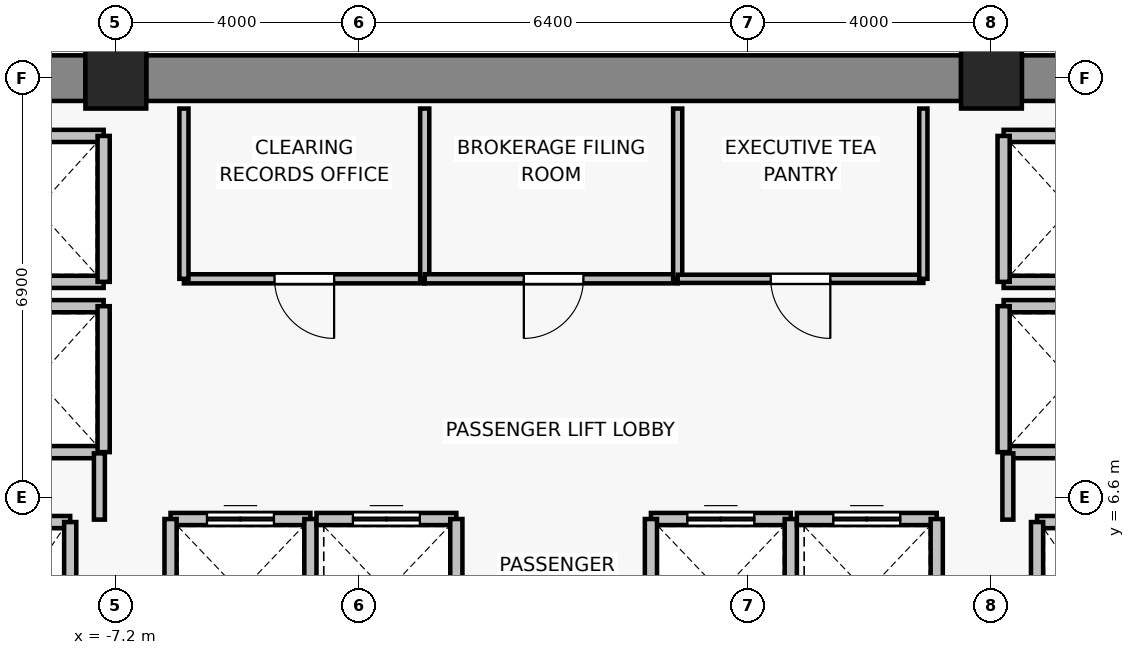
"""IFC4 building model, lengths in metres.
Left out: names, types, materials, properties, quantities, classifications, styles, units other than length and angle.
Written with IfcOpenShell. Run it as: python <this file> out.ifc"""

import sys

from ifc_helpers import new_model, si_unit, direction, frame, frame_2d, origin, origin_2d, place, context, subcontext, project, spatial, rectangle, extrude, source, transform, mapped, element, fill, save


model = new_model("IFC4")
c1 = context("Model", 3, precision=1e-05, world=origin(), true_north=direction((0.0, 1.0)))
c2 = subcontext(c1, "Body", "Model", "MODEL_VIEW")
j1 = project(units=[si_unit("LENGTHUNIT", "METRE"), si_unit("PLANEANGLEUNIT", "RADIAN")], contexts=[c1])
p1 = place(None, origin())
s1 = spatial("IfcSite", under=j1, at=p1, CompositionType="ELEMENT")
p2 = place(p1, origin())
s2 = spatial("IfcBuilding", under=s1, at=p2, CompositionType="ELEMENT")
p3 = place(p2, frame((0.0, 0.0, 113.2)))
s3 = spatial("IfcBuildingStorey", under=s2, at=p3, CompositionType="ELEMENT", Elevation=113.2)
for number, where, z_axis, x_axis in (
    (1, (-7.2, 13.5, 0.0), (0.0, 0.0, 1.0), (1.0, 0.0, 0.0)),
    (2, (7.2, 13.5, 0.0), (0.0, 0.0, 1.0), (1.0, 0.0, 0.0)),
):
    element("IfcColumn", number, at=place(p3, frame(where, z_axis=z_axis, x_axis=x_axis)), inside=s3, PredefinedType="COLUMN", context=c2, shape_type="SweptSolid", body=[
        extrude(rectangle(XDim=1.0, YDim=1.0, at=origin_2d()), origin(), (0.0, 0.0, 1.0), 3.3),
    ])
p4 = place(p3, frame((-13.9, 13.5, 0.0), z_axis=(0.0, 0.0, 1.0), x_axis=(1.0, 0.0, 0.0)))
e3 = element("IfcWall", 3, at=p4, inside=s3, PredefinedType="SHEAR", context=c2, shape_type="SweptSolid", body=[
    extrude(rectangle(XDim=6.2, YDim=0.75, at=frame_2d((3.1, 0.0))), origin(), (0.0, 0.0, 1.0), 3.075),
])
p5 = place(p3, frame((-6.7, 13.5, 0.0), z_axis=(0.0, 0.0, 1.0), x_axis=(1.0, 0.0, 0.0)))
e4 = element("IfcWall", 4, at=p5, inside=s3, PredefinedType="SHEAR", context=c2, shape_type="SweptSolid", body=[
    extrude(rectangle(XDim=13.4, YDim=0.75, at=frame_2d((6.7, 0.0))), origin(), (0.0, 0.0, 1.0), 3.075),
])
p6 = place(p3, frame((7.7, 13.5, 0.0), z_axis=(0.0, 0.0, 1.0), x_axis=(1.0, 0.0, 0.0)))
e5 = element("IfcWall", 5, at=p6, inside=s3, PredefinedType="SHEAR", context=c2, shape_type="SweptSolid", body=[
    extrude(rectangle(XDim=6.2, YDim=0.75, at=frame_2d((3.1, 0.0))), origin(), (0.0, 0.0, 1.0), 3.075),
])
p7 = place(p3, frame((-9.95, 6.2, 0.0), z_axis=(0.0, 0.0, 1.0), x_axis=(1.0, 0.0, 0.0)))
e6 = element("IfcWall", 6, at=p7, inside=s3, PredefinedType="SOLIDWALL", context=c2, shape_type="SweptSolid", body=[
    extrude(rectangle(XDim=2.0, YDim=0.2, at=frame_2d((1.0, 0.0))), origin(), (0.0, 0.0, 1.0), 3.075),
])
p8 = place(p3, frame((-7.95, 6.2, 0.0), z_axis=(0.0, 0.0, 1.0), x_axis=(0.0, -1.0, 0.0)))
e7 = element("IfcWall", 7, at=p8, inside=s3, PredefinedType="SOLIDWALL", context=c2, shape_type="SweptSolid", body=[
    extrude(rectangle(XDim=2.8, YDim=0.2, at=frame_2d((1.4, 0.0))), origin(), (0.0, 0.0, 1.0), 3.075),
])
p9 = place(p3, frame((7.95, 6.2, 0.0), z_axis=(0.0, 0.0, 1.0), x_axis=(1.0, 0.0, 0.0)))
e8 = element("IfcWall", 8, at=p9, inside=s3, PredefinedType="SOLIDWALL", context=c2, shape_type="SweptSolid", body=[
    extrude(rectangle(XDim=2.0, YDim=0.2, at=frame_2d((1.0, 0.0))), origin(), (0.0, 0.0, 1.0), 3.075),
])
p10 = place(p3, frame((7.95, 3.4, 0.0), z_axis=(0.0, 0.0, 1.0), x_axis=(0.0, 1.0, 0.0)))
e9 = element("IfcWall", 9, at=p10, inside=s3, PredefinedType="SOLIDWALL", context=c2, shape_type="SweptSolid", body=[
    extrude(rectangle(XDim=2.8, YDim=0.2, at=frame_2d((1.4, 0.0))), origin(), (0.0, 0.0, 1.0), 3.075),
])
p11 = place(p3, frame((-6.3, 6.25, 0.0), z_axis=(0.0, 0.0, 1.0), x_axis=(1.0, 0.0, 0.0)))
e10 = element("IfcWall", 10, at=p11, inside=s3, PredefinedType="SOLIDWALL", context=c2, shape_type="SweptSolid", body=[
    extrude(rectangle(XDim=2.3, YDim=0.2, at=frame_2d((1.15, 0.0))), origin(), (0.0, 0.0, 1.0), 3.075),
])
p12 = place(p11, frame((0.6, 0.0, 0.0)))
e11 = element("IfcOpeningElement", 11, at=p12, cuts=e10, PredefinedType="OPENING", context=c2, shape_type="SweptSolid", body=[
    extrude(rectangle(XDim=1.1, YDim=2.2, at=frame_2d((0.55, 1.1))), frame((0.0, 0.11, 0.0), z_axis=(0.0, -1.0, 0.0), x_axis=(1.0, 0.0, 0.0)), (0.0, 0.0, 1.0), 0.22),
])
for number, where, z_axis, x_axis in (
    (12, (-6.3, 3.85, 0.0), (0.0, 0.0, 1.0), (0.0, 1.0, 0.0)),
    (13, (-4.0, 6.25, 0.0), (0.0, 0.0, 1.0), (0.0, -1.0, 0.0)),
):
    element("IfcWall", number, at=place(p3, frame(where, z_axis=z_axis, x_axis=x_axis)), inside=s3, PredefinedType="SOLIDWALL", context=c2, shape_type="SweptSolid", body=[
        extrude(rectangle(XDim=2.4, YDim=0.2, at=frame_2d((1.2, 0.0))), origin(), (0.0, 0.0, 1.0), 3.075),
    ])
p13 = place(p3, frame((-3.9, 6.25, 0.0), z_axis=(0.0, 0.0, 1.0), x_axis=(1.0, 0.0, 0.0)))
e14 = element("IfcWall", 14, at=p13, inside=s3, PredefinedType="SOLIDWALL", context=c2, shape_type="SweptSolid", body=[
    extrude(rectangle(XDim=2.3, YDim=0.2, at=frame_2d((1.15, 0.0))), origin(), (0.0, 0.0, 1.0), 3.075),
])
p14 = place(p13, frame((0.6, 0.0, 0.0)))
e15 = element("IfcOpeningElement", 15, at=p14, cuts=e14, PredefinedType="OPENING", context=c2, shape_type="SweptSolid", body=[
    extrude(rectangle(XDim=1.1, YDim=2.2, at=frame_2d((0.55, 1.1))), frame((0.0, 0.11, 0.0), z_axis=(0.0, -1.0, 0.0), x_axis=(1.0, 0.0, 0.0)), (0.0, 0.0, 1.0), 0.22),
])
p15 = place(p3, frame((-1.6, 6.25, 0.0), z_axis=(0.0, 0.0, 1.0), x_axis=(0.0, -1.0, 0.0)))
e16 = element("IfcWall", 16, at=p15, inside=s3, PredefinedType="SOLIDWALL", context=c2, shape_type="SweptSolid", body=[
    extrude(rectangle(XDim=2.4, YDim=0.2, at=frame_2d((1.2, 0.0))), origin(), (0.0, 0.0, 1.0), 3.075),
])
p16 = place(p3, frame((1.6, 6.25, 0.0), z_axis=(0.0, 0.0, 1.0), x_axis=(1.0, 0.0, 0.0)))
e17 = element("IfcWall", 17, at=p16, inside=s3, PredefinedType="SOLIDWALL", context=c2, shape_type="SweptSolid", body=[
    extrude(rectangle(XDim=2.3, YDim=0.2, at=frame_2d((1.15, 0.0))), origin(), (0.0, 0.0, 1.0), 3.075),
])
p17 = place(p16, frame((0.6, 0.0, 0.0)))
e18 = element("IfcOpeningElement", 18, at=p17, cuts=e17, PredefinedType="OPENING", context=c2, shape_type="SweptSolid", body=[
    extrude(rectangle(XDim=1.1, YDim=2.2, at=frame_2d((0.55, 1.1))), frame((0.0, 0.11, 0.0), z_axis=(0.0, -1.0, 0.0), x_axis=(1.0, 0.0, 0.0)), (0.0, 0.0, 1.0), 0.22),
])
for number, where, z_axis, x_axis in (
    (19, (1.6, 3.85, 0.0), (0.0, 0.0, 1.0), (0.0, 1.0, 0.0)),
    (20, (3.9, 6.25, 0.0), (0.0, 0.0, 1.0), (0.0, -1.0, 0.0)),
):
    element("IfcWall", number, at=place(p3, frame(where, z_axis=z_axis, x_axis=x_axis)), inside=s3, PredefinedType="SOLIDWALL", context=c2, shape_type="SweptSolid", body=[
        extrude(rectangle(XDim=2.4, YDim=0.2, at=frame_2d((1.2, 0.0))), origin(), (0.0, 0.0, 1.0), 3.075),
    ])
p18 = place(p3, frame((4.0, 6.25, 0.0), z_axis=(0.0, 0.0, 1.0), x_axis=(1.0, 0.0, 0.0)))
e21 = element("IfcWall", 21, at=p18, inside=s3, PredefinedType="SOLIDWALL", context=c2, shape_type="SweptSolid", body=[
    extrude(rectangle(XDim=2.3, YDim=0.2, at=frame_2d((1.15, 0.0))), origin(), (0.0, 0.0, 1.0), 3.075),
])
p19 = place(p18, frame((0.6, 0.0, 0.0)))
e22 = element("IfcOpeningElement", 22, at=p19, cuts=e21, PredefinedType="OPENING", context=c2, shape_type="SweptSolid", body=[
    extrude(rectangle(XDim=1.1, YDim=2.2, at=frame_2d((0.55, 1.1))), frame((0.0, 0.11, 0.0), z_axis=(0.0, -1.0, 0.0), x_axis=(1.0, 0.0, 0.0)), (0.0, 0.0, 1.0), 0.22),
])
p20 = place(p3, frame((6.3, 6.25, 0.0), z_axis=(0.0, 0.0, 1.0), x_axis=(0.0, -1.0, 0.0)))
e23 = element("IfcWall", 23, at=p20, inside=s3, PredefinedType="SOLIDWALL", context=c2, shape_type="SweptSolid", body=[
    extrude(rectangle(XDim=2.4, YDim=0.2, at=frame_2d((1.2, 0.0))), origin(), (0.0, 0.0, 1.0), 3.075),
])
for number, where, z_axis, x_axis in (
    (24, (-7.4, 7.35, 0.0), (0.0, 0.0, 1.0), (-1.0, 0.0, 0.0)),
    (25, (-9.6, 9.75, 0.0), (0.0, 0.0, 1.0), (1.0, 0.0, 0.0)),
):
    element("IfcWall", number, at=place(p3, frame(where, z_axis=z_axis, x_axis=x_axis)), inside=s3, PredefinedType="SOLIDWALL", context=c2, shape_type="SweptSolid", body=[
        extrude(rectangle(XDim=2.2, YDim=0.2, at=frame_2d((1.1, 0.0))), origin(), (0.0, 0.0, 1.0), 2.515),
    ])
p21 = place(p3, frame((-7.4, 9.75, 0.0), z_axis=(0.0, 0.0, 1.0), x_axis=(0.0, -1.0, 0.0)))
e26 = element("IfcWall", 26, at=p21, inside=s3, PredefinedType="SOLIDWALL", context=c2, shape_type="SweptSolid", body=[
    extrude(rectangle(XDim=2.4, YDim=0.2, at=frame_2d((1.2, 0.0))), origin(), (0.0, 0.0, 1.0), 2.515),
])
for number, where, z_axis, x_axis in (
    (27, (-7.4, 10.15, 0.0), (0.0, 0.0, 1.0), (-1.0, 0.0, 0.0)),
    (28, (-9.6, 12.55, 0.0), (0.0, 0.0, 1.0), (1.0, 0.0, 0.0)),
):
    element("IfcWall", number, at=place(p3, frame(where, z_axis=z_axis, x_axis=x_axis)), inside=s3, PredefinedType="SOLIDWALL", context=c2, shape_type="SweptSolid", body=[
        extrude(rectangle(XDim=2.2, YDim=0.2, at=frame_2d((1.1, 0.0))), origin(), (0.0, 0.0, 1.0), 2.515),
    ])
p22 = place(p3, frame((-7.4, 12.55, 0.0), z_axis=(0.0, 0.0, 1.0), x_axis=(0.0, -1.0, 0.0)))
e29 = element("IfcWall", 29, at=p22, inside=s3, PredefinedType="SOLIDWALL", context=c2, shape_type="SweptSolid", body=[
    extrude(rectangle(XDim=2.4, YDim=0.2, at=frame_2d((1.2, 0.0))), origin(), (0.0, 0.0, 1.0), 2.515),
])
for number, where, z_axis, x_axis in (
    (30, (9.6, 7.35, 0.0), (0.0, 0.0, 1.0), (-1.0, 0.0, 0.0)),
    (31, (7.4, 9.75, 0.0), (0.0, 0.0, 1.0), (1.0, 0.0, 0.0)),
):
    element("IfcWall", number, at=place(p3, frame(where, z_axis=z_axis, x_axis=x_axis)), inside=s3, PredefinedType="SOLIDWALL", context=c2, shape_type="SweptSolid", body=[
        extrude(rectangle(XDim=2.2, YDim=0.2, at=frame_2d((1.1, 0.0))), origin(), (0.0, 0.0, 1.0), 2.515),
    ])
p23 = place(p3, frame((7.4, 7.35, 0.0), z_axis=(0.0, 0.0, 1.0), x_axis=(0.0, 1.0, 0.0)))
e32 = element("IfcWall", 32, at=p23, inside=s3, PredefinedType="SOLIDWALL", context=c2, shape_type="SweptSolid", body=[
    extrude(rectangle(XDim=2.4, YDim=0.2, at=frame_2d((1.2, 0.0))), origin(), (0.0, 0.0, 1.0), 2.515),
])
for number, where, z_axis, x_axis in (
    (33, (9.6, 10.15, 0.0), (0.0, 0.0, 1.0), (-1.0, 0.0, 0.0)),
    (34, (7.4, 12.55, 0.0), (0.0, 0.0, 1.0), (1.0, 0.0, 0.0)),
):
    element("IfcWall", number, at=place(p3, frame(where, z_axis=z_axis, x_axis=x_axis)), inside=s3, PredefinedType="SOLIDWALL", context=c2, shape_type="SweptSolid", body=[
        extrude(rectangle(XDim=2.2, YDim=0.2, at=frame_2d((1.1, 0.0))), origin(), (0.0, 0.0, 1.0), 2.515),
    ])
p24 = place(p3, frame((7.4, 10.15, 0.0), z_axis=(0.0, 0.0, 1.0), x_axis=(0.0, 1.0, 0.0)))
e35 = element("IfcWall", 35, at=p24, inside=s3, PredefinedType="SOLIDWALL", context=c2, shape_type="SweptSolid", body=[
    extrude(rectangle(XDim=2.4, YDim=0.2, at=frame_2d((1.2, 0.0))), origin(), (0.0, 0.0, 1.0), 2.515),
])
for number, where, z_axis, x_axis in (
    (36, (-7.47, 7.33, 0.0), (0.0, 0.0, 1.0), (0.0, -1.0, 0.0)),
    (37, (7.47, 6.24, 0.0), (0.0, 0.0, 1.0), (0.0, 1.0, 0.0)),
):
    element("IfcWall", number, at=place(p3, frame(where, z_axis=z_axis, x_axis=x_axis)), inside=s3, PredefinedType="PARTITIONING", context=c2, shape_type="SweptSolid", body=[
        extrude(rectangle(XDim=1.09, YDim=0.18, at=frame_2d((0.545, 0.0))), origin(), (0.0, 0.0, 1.0), 2.515),
    ])
p25 = place(p3, frame((-2.12, 10.2, 0.0), z_axis=(0.0, 0.0, 1.0), x_axis=(-1.0, 0.0, 0.0)))
e38 = element("IfcWall", 38, at=p25, inside=s3, PredefinedType="PARTITIONING", context=c2, shape_type="SweptSolid", body=[
    extrude(rectangle(XDim=3.96, YDim=0.15, at=frame_2d((1.98, 0.0))), origin(), (0.0, 0.0, 1.0), 3.075),
])
p26 = place(p25, frame((1.49, 0.0, 0.0)))
e39 = element("IfcOpeningElement", 39, at=p26, cuts=e38, PredefinedType="OPENING", context=c2, shape_type="SweptSolid", body=[
    extrude(rectangle(XDim=0.98, YDim=2.15, at=frame_2d((0.49, 1.075))), frame((0.0, 0.085, 0.0), z_axis=(0.0, -1.0, 0.0), x_axis=(1.0, 0.0, 0.0)), (0.0, 0.0, 1.0), 0.17),
])
for number, where, z_axis, x_axis in (
    (40, (-6.08, 10.2, 0.0), (0.0, 0.0, 1.0), (0.0, 1.0, 0.0)),
    (41, (-2.12, 13.0, 0.0), (0.0, 0.0, 1.0), (0.0, -1.0, 0.0)),
):
    element("IfcWall", number, at=place(p3, frame(where, z_axis=z_axis, x_axis=x_axis)), inside=s3, PredefinedType="PARTITIONING", context=c2, shape_type="SweptSolid", body=[
        extrude(rectangle(XDim=2.8, YDim=0.15, at=frame_2d((1.4, 0.0))), origin(), (0.0, 0.0, 1.0), 3.075),
    ])
p27 = place(p3, frame((2.04, 10.2, 0.0), z_axis=(0.0, 0.0, 1.0), x_axis=(-1.0, 0.0, 0.0)))
e42 = element("IfcWall", 42, at=p27, inside=s3, PredefinedType="PARTITIONING", context=c2, shape_type="SweptSolid", body=[
    extrude(rectangle(XDim=4.16, YDim=0.15, at=frame_2d((2.08, 0.0))), origin(), (0.0, 0.0, 1.0), 3.075),
])
p28 = place(p27, frame((1.55, 0.0, 0.0)))
e43 = element("IfcOpeningElement", 43, at=p28, cuts=e42, PredefinedType="OPENING", context=c2, shape_type="SweptSolid", body=[
    extrude(rectangle(XDim=0.98, YDim=2.15, at=frame_2d((0.49, 1.075))), frame((0.0, 0.085, 0.0), z_axis=(0.0, -1.0, 0.0), x_axis=(1.0, 0.0, 0.0)), (0.0, 0.0, 1.0), 0.17),
])
p29 = place(p3, frame((2.04, 13.0, 0.0), z_axis=(0.0, 0.0, 1.0), x_axis=(0.0, -1.0, 0.0)))
e44 = element("IfcWall", 44, at=p29, inside=s3, PredefinedType="PARTITIONING", context=c2, shape_type="SweptSolid", body=[
    extrude(rectangle(XDim=2.8, YDim=0.15, at=frame_2d((1.4, 0.0))), origin(), (0.0, 0.0, 1.0), 3.075),
])
p30 = place(p3, frame((6.08, 10.2, 0.0), z_axis=(0.0, 0.0, 1.0), x_axis=(-1.0, 0.0, 0.0)))
e45 = element("IfcWall", 45, at=p30, inside=s3, PredefinedType="PARTITIONING", context=c2, shape_type="SweptSolid", body=[
    extrude(rectangle(XDim=4.04, YDim=0.135, at=frame_2d((2.02, 0.0))), origin(), (0.0, 0.0, 1.0), 2.59),
])
p31 = place(p30, frame((1.53, 0.0, 0.0)))
e46 = element("IfcOpeningElement", 46, at=p31, cuts=e45, PredefinedType="OPENING", context=c2, shape_type="SweptSolid", body=[
    extrude(rectangle(XDim=0.98, YDim=2.15, at=frame_2d((0.49, 1.075))), frame((0.0, 0.077, 0.0), z_axis=(0.0, -1.0, 0.0), x_axis=(1.0, 0.0, 0.0)), (0.0, 0.0, 1.0), 0.155),
])
p32 = place(p3, frame((6.08, 13.0, 0.0), z_axis=(0.0, 0.0, 1.0), x_axis=(0.0, -1.0, 0.0)))
e47 = element("IfcWall", 47, at=p32, inside=s3, PredefinedType="PARTITIONING", context=c2, shape_type="SweptSolid", body=[
    extrude(rectangle(XDim=2.8, YDim=0.135, at=frame_2d((1.4, 0.0))), origin(), (0.0, 0.0, 1.0), 3.075),
])
m1 = source(origin(), c2, "Body", "SweptSolid", [
    extrude(rectangle(XDim=1.1, YDim=2.2, at=frame_2d((0.55, 1.1))), frame((0.0, 0.025, 0.0), z_axis=(0.0, -1.0, 0.0), x_axis=(1.0, 0.0, 0.0)), (0.0, 0.0, 1.0), 0.05),
])
p33 = place(p12, origin())
e48 = element("IfcDoor", 48, at=p33, inside=s3, OperationType="DOUBLE_DOOR_SLIDING", PredefinedType="DOOR", context=c2, shape_type="MappedRepresentation", body=[
    mapped(m1, transform((0.0, 0.0, 0.0), x_axis=(1.0, 0.0, 0.0), y_axis=(0.0, 1.0, 0.0), z_axis=(0.0, 0.0, 1.0), scale=1.0)),
])
fill(e11, e48)
p34 = place(p14, origin())
e49 = element("IfcDoor", 49, at=p34, inside=s3, OperationType="DOUBLE_DOOR_SLIDING", PredefinedType="DOOR", context=c2, shape_type="MappedRepresentation", body=[
    mapped(m1, transform((0.0, 0.0, 0.0), x_axis=(1.0, 0.0, 0.0), y_axis=(0.0, 1.0, 0.0), z_axis=(0.0, 0.0, 1.0), scale=1.0)),
])
fill(e15, e49)
p35 = place(p17, origin())
e50 = element("IfcDoor", 50, at=p35, inside=s3, OperationType="DOUBLE_DOOR_SLIDING", PredefinedType="DOOR", context=c2, shape_type="MappedRepresentation", body=[
    mapped(m1, transform((0.0, 0.0, 0.0), x_axis=(1.0, 0.0, 0.0), y_axis=(0.0, 1.0, 0.0), z_axis=(0.0, 0.0, 1.0), scale=1.0)),
])
fill(e18, e50)
p36 = place(p19, origin())
e51 = element("IfcDoor", 51, at=p36, inside=s3, OperationType="DOUBLE_DOOR_SLIDING", PredefinedType="DOOR", context=c2, shape_type="MappedRepresentation", body=[
    mapped(m1, transform((0.0, 0.0, 0.0), x_axis=(1.0, 0.0, 0.0), y_axis=(0.0, 1.0, 0.0), z_axis=(0.0, 0.0, 1.0), scale=1.0)),
])
fill(e22, e51)
m2 = source(origin(), c2, "Body", "SweptSolid", [
    extrude(rectangle(XDim=0.98, YDim=2.15, at=frame_2d((0.49, 1.075))), frame((0.0, 0.025, 0.0), z_axis=(0.0, -1.0, 0.0), x_axis=(1.0, 0.0, 0.0)), (0.0, 0.0, 1.0), 0.05),
])
p37 = place(p26, origin())
e52 = element("IfcDoor", 52, at=p37, inside=s3, OperationType="SINGLE_SWING_LEFT", PredefinedType="DOOR", context=c2, shape_type="MappedRepresentation", body=[
    mapped(m2, transform((0.0, 0.0, 0.0), x_axis=(1.0, 0.0, 0.0), y_axis=(0.0, 1.0, 0.0), z_axis=(0.0, 0.0, 1.0), scale=1.0)),
])
fill(e39, e52)
p38 = place(p28, origin())
e53 = element("IfcDoor", 53, at=p38, inside=s3, OperationType="SINGLE_SWING_RIGHT", PredefinedType="DOOR", context=c2, shape_type="MappedRepresentation", body=[
    mapped(m2, transform((0.0, 0.0, 0.0), x_axis=(1.0, 0.0, 0.0), y_axis=(0.0, 1.0, 0.0), z_axis=(0.0, 0.0, 1.0), scale=1.0)),
])
fill(e43, e53)
p39 = place(p31, origin())
e54 = element("IfcDoor", 54, at=p39, inside=s3, OperationType="SINGLE_SWING_LEFT", PredefinedType="DOOR", context=c2, shape_type="MappedRepresentation", body=[
    mapped(m2, transform((0.0, 0.0, 0.0), x_axis=(1.0, 0.0, 0.0), y_axis=(0.0, 1.0, 0.0), z_axis=(0.0, 0.0, 1.0), scale=1.0)),
])
fill(e46, e54)
save(model, sys.argv[1])
